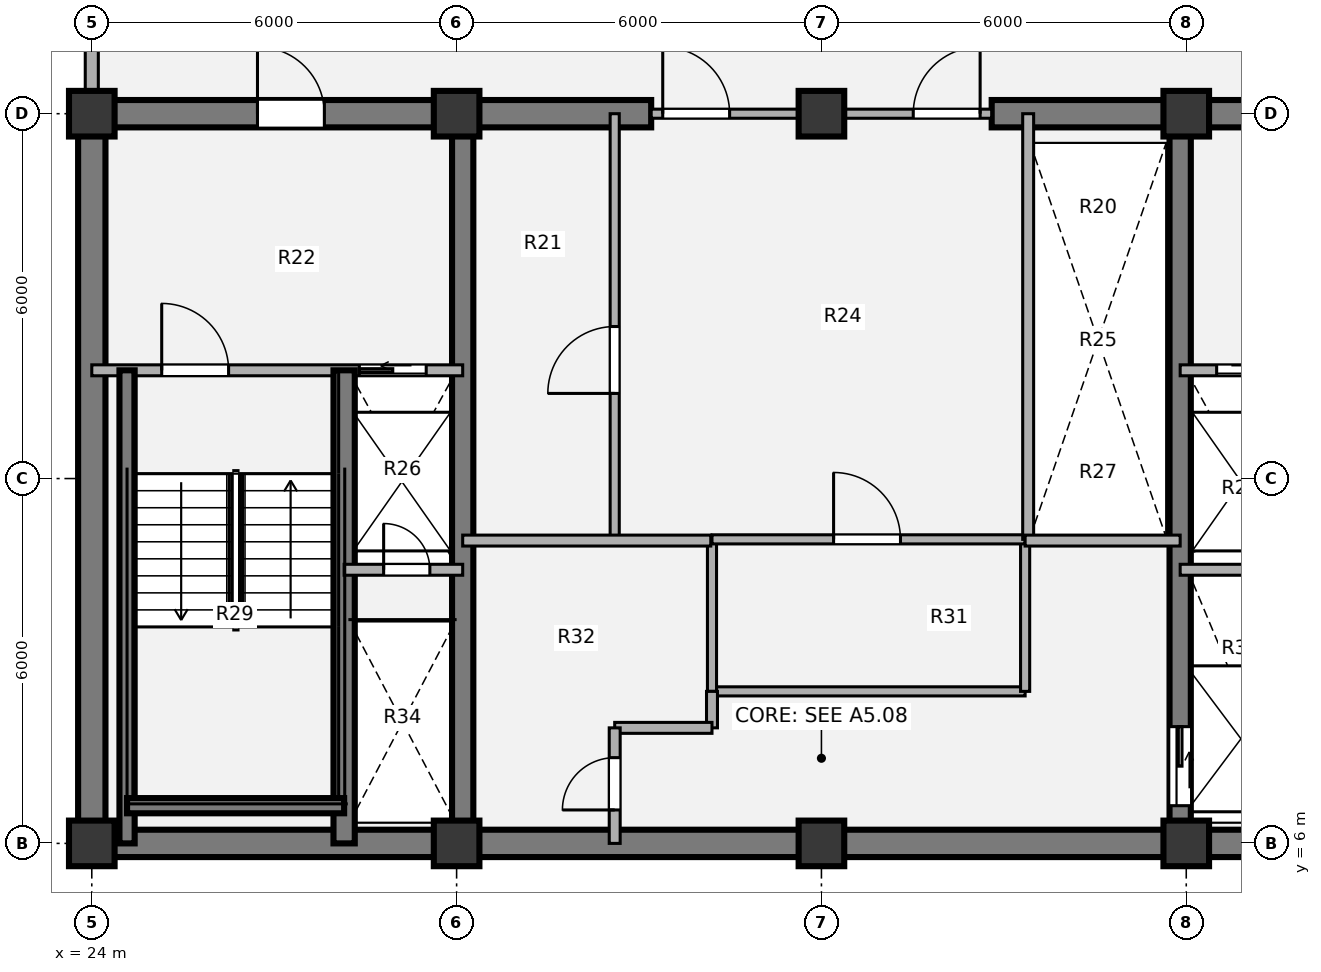
"""IFC4 building model, lengths in metres.
Left out: names, types, materials, properties, quantities, classifications, styles, units other than length and angle.
Written with IfcOpenShell. Run it as: python <this file> out.ifc"""

import sys

from ifc_helpers import new_model, si_unit, direction, frame, frame_2d, origin, origin_2d, place, context, subcontext, project, spatial, rectangle, extrude, source, transform, mapped, element, fill, save


model = new_model("IFC4")
c1 = context("Model", 3, precision=1e-05, world=origin(), true_north=direction((0.0, 1.0)))
c2 = subcontext(c1, "Body", "Model", "MODEL_VIEW")
j1 = project(units=[si_unit("LENGTHUNIT", "METRE"), si_unit("PLANEANGLEUNIT", "RADIAN")], contexts=[c1])
p1 = place(None, origin())
s1 = spatial("IfcSite", under=j1, at=p1, CompositionType="ELEMENT")
p2 = place(p1, origin())
s2 = spatial("IfcBuilding", under=s1, at=p2, CompositionType="ELEMENT")
p3 = place(p2, frame((0.0, 0.0, 179.1)))
s3 = spatial("IfcBuildingStorey", under=s2, at=p3, CompositionType="ELEMENT", Elevation=179.1)
m1 = source(origin(), c2, "Body", "SweptSolid", [
    extrude(rectangle(XDim=0.75, YDim=0.75, at=origin_2d()), origin(), (0.0, 0.0, 1.0), 3.78),
])
for number, where, z_axis, x_axis in (
    (1, (24.0, 6.0, 0.0), (0.0, 0.0, 1.0), (1.0, 0.0, 0.0)),
    (2, (30.0, 6.0, 0.0), (0.0, 0.0, 1.0), (1.0, 0.0, 0.0)),
    (3, (36.0, 6.0, 0.0), (0.0, 0.0, 1.0), (1.0, 0.0, 0.0)),
    (4, (42.0, 6.0, 0.0), (0.0, 0.0, 1.0), (1.0, 0.0, 0.0)),
    (5, (24.0, 18.0, 0.0), (0.0, 0.0, 1.0), (1.0, 0.0, 0.0)),
    (6, (30.0, 18.0, 0.0), (0.0, 0.0, 1.0), (1.0, 0.0, 0.0)),
    (7, (36.0, 18.0, 0.0), (0.0, 0.0, 1.0), (1.0, 0.0, 0.0)),
    (8, (42.0, 18.0, 0.0), (0.0, 0.0, 1.0), (1.0, 0.0, 0.0)),
):
    element("IfcColumn", number, at=place(p3, frame(where, z_axis=z_axis, x_axis=x_axis)), inside=s3, PredefinedType="COLUMN", context=c2, shape_type="MappedRepresentation", body=[
        mapped(m1, transform((0.0, 0.0, 0.0), x_axis=(1.0, 0.0, 0.0), y_axis=(0.0, 1.0, 0.0), z_axis=(0.0, 0.0, 1.0), scale=1.0)),
    ])
p4 = place(p3, frame((48.225, 6.0, 0.0), z_axis=(0.0, 0.0, 1.0), x_axis=(-1.0, 0.0, 0.0)))
e9 = element("IfcWall", 9, at=p4, inside=s3, PredefinedType="SHEAR", context=c2, shape_type="SweptSolid", body=[
    extrude(rectangle(XDim=24.45, YDim=0.45, at=frame_2d((12.225, 0.0))), origin(), (0.0, 0.0, 1.0), 3.78),
])
p5 = place(p3, frame((24.0, 6.0, 0.0), z_axis=(0.0, 0.0, 1.0), x_axis=(0.0, 1.0, 0.0)))
e10 = element("IfcWall", 10, at=p5, inside=s3, PredefinedType="SHEAR", context=c2, shape_type="SweptSolid", body=[
    extrude(rectangle(XDim=12.0, YDim=0.45, at=frame_2d((6.0, 0.0))), origin(), (0.0, 0.0, 1.0), 3.78),
])
p6 = place(p3, frame((23.775, 18.0, 0.0), z_axis=(0.0, 0.0, 1.0), x_axis=(1.0, 0.0, 0.0)))
e11 = element("IfcWall", 11, at=p6, inside=s3, PredefinedType="SHEAR", context=c2, shape_type="SweptSolid", body=[
    extrude(rectangle(XDim=9.425, YDim=0.45, at=frame_2d((4.712, 0.0))), origin(), (0.0, 0.0, 1.0), 3.78),
])
p7 = place(p6, frame((2.95, 0.0, 0.0)))
e12 = element("IfcOpeningElement", 12, at=p7, cuts=e11, PredefinedType="OPENING", context=c2, shape_type="SweptSolid", body=[
    extrude(rectangle(XDim=1.1, YDim=2.1, at=origin_2d()), frame((0.55, 0.235, 1.05), z_axis=(0.0, -1.0, 0.0), x_axis=(1.0, 0.0, 0.0)), (0.0, 0.0, 1.0), 0.47),
])
p8 = place(p3, frame((38.8, 18.0, 0.0), z_axis=(0.0, 0.0, 1.0), x_axis=(1.0, 0.0, 0.0)))
e13 = element("IfcWall", 13, at=p8, inside=s3, PredefinedType="SHEAR", context=c2, shape_type="SweptSolid", body=[
    extrude(rectangle(XDim=9.425, YDim=0.45, at=frame_2d((4.712, 0.0))), origin(), (0.0, 0.0, 1.0), 3.78),
])
p9 = place(p8, frame((5.45, 0.0, 0.0)))
e14 = element("IfcOpeningElement", 14, at=p9, cuts=e13, PredefinedType="OPENING", context=c2, shape_type="SweptSolid", body=[
    extrude(rectangle(XDim=1.1, YDim=2.1, at=origin_2d()), frame((0.55, 0.235, 1.05), z_axis=(0.0, -1.0, 0.0), x_axis=(1.0, 0.0, 0.0)), (0.0, 0.0, 1.0), 0.47),
])
p10 = place(p3, frame((30.1, 6.0, 0.0), z_axis=(0.0, 0.0, 1.0), x_axis=(0.0, 1.0, 0.0)))
e15 = element("IfcWall", 15, at=p10, inside=s3, PredefinedType="SHEAR", context=c2, shape_type="SweptSolid", body=[
    extrude(rectangle(XDim=12.0, YDim=0.35, at=frame_2d((6.0, 0.0))), origin(), (0.0, 0.0, 1.0), 3.78),
])
p11 = place(p3, frame((41.9, 18.0, 0.0), z_axis=(0.0, 0.0, 1.0), x_axis=(0.0, -1.0, 0.0)))
e16 = element("IfcWall", 16, at=p11, inside=s3, PredefinedType="SHEAR", context=c2, shape_type="SweptSolid", body=[
    extrude(rectangle(XDim=12.0, YDim=0.35, at=frame_2d((6.0, 0.0))), origin(), (0.0, 0.0, 1.0), 3.78),
])
p12 = place(p11, frame((10.08, 0.0, 0.0)))
e17 = element("IfcOpeningElement", 17, at=p12, cuts=e16, PredefinedType="OPENING", context=c2, shape_type="SweptSolid", body=[
    extrude(rectangle(XDim=1.3, YDim=2.1, at=origin_2d()), frame((0.65, 0.185, 1.05), z_axis=(0.0, -1.0, 0.0), x_axis=(1.0, 0.0, 0.0)), (0.0, 0.0, 1.0), 0.37),
])
p13 = place(p3, frame((24.0, 18.355, 0.0), z_axis=(0.0, 0.0, 1.0), x_axis=(0.0, 1.0, 0.0)))
e18 = element("IfcWall", 18, at=p13, inside=s3, PredefinedType="SOLIDWALL", context=c2, shape_type="SweptSolid", body=[
    extrude(rectangle(XDim=2.695, YDim=0.215, at=frame_2d((1.348, 0.0))), origin(), (0.0, 0.0, 1.0), 2.718),
])
p14 = place(p3, frame((32.6, 11.0, 0.0), z_axis=(0.0, 0.0, 1.0), x_axis=(0.0, 1.0, 0.0)))
e19 = element("IfcWall", 19, at=p14, inside=s3, PredefinedType="PARTITIONING", context=c2, shape_type="SweptSolid", body=[
    extrude(rectangle(XDim=7.0, YDim=0.15, at=frame_2d((3.5, 0.0))), origin(), (0.0, 0.0, 1.0), 3.5),
])
p15 = place(p14, frame((2.4, 0.0, 0.0)))
e20 = element("IfcOpeningElement", 20, at=p15, cuts=e19, PredefinedType="OPENING", context=c2, shape_type="SweptSolid", body=[
    extrude(rectangle(XDim=1.1, YDim=2.1, at=origin_2d()), frame((0.55, 0.085, 1.05), z_axis=(0.0, -1.0, 0.0), x_axis=(1.0, 0.0, 0.0)), (0.0, 0.0, 1.0), 0.17),
])
p16 = place(p3, frame((34.2, 8.5, 0.0), z_axis=(0.0, 0.0, 1.0), x_axis=(1.0, 0.0, 0.0)))
e21 = element("IfcWall", 21, at=p16, inside=s3, PredefinedType="PARTITIONING", context=c2, shape_type="SweptSolid", body=[
    extrude(rectangle(XDim=5.15, YDim=0.15, at=frame_2d((2.575, 0.0))), origin(), (0.0, 0.0, 1.0), 3.5),
])
for number, where, z_axis, x_axis in (
    (22, (34.2, 8.5, 0.0), (0.0, 0.0, 1.0), (0.0, 1.0, 0.0)),
    (23, (39.35, 8.5, 0.0), (0.0, 0.0, 1.0), (0.0, 1.0, 0.0)),
):
    element("IfcWall", number, at=place(p3, frame(where, z_axis=z_axis, x_axis=x_axis)), inside=s3, PredefinedType="PARTITIONING", context=c2, shape_type="SweptSolid", body=[
        extrude(rectangle(XDim=2.5, YDim=0.15, at=frame_2d((1.25, 0.0))), origin(), (0.0, 0.0, 1.0), 3.5),
    ])
p17 = place(p3, frame((34.2, 11.0, 0.0), z_axis=(0.0, 0.0, 1.0), x_axis=(1.0, 0.0, 0.0)))
e24 = element("IfcWall", 24, at=p17, inside=s3, PredefinedType="PARTITIONING", context=c2, shape_type="SweptSolid", body=[
    extrude(rectangle(XDim=5.15, YDim=0.15, at=frame_2d((2.575, 0.0))), origin(), (0.0, 0.0, 1.0), 3.5),
])
p18 = place(p17, frame((2.0, 0.0, 0.0)))
e25 = element("IfcOpeningElement", 25, at=p18, cuts=e24, PredefinedType="OPENING", context=c2, shape_type="SweptSolid", body=[
    extrude(rectangle(XDim=1.1, YDim=2.1, at=origin_2d()), frame((0.55, 0.085, 1.05), z_axis=(0.0, -1.0, 0.0), x_axis=(1.0, 0.0, 0.0)), (0.0, 0.0, 1.0), 0.17),
])
p19 = place(p3, frame((39.4, 11.0, 0.0), z_axis=(0.0, 0.0, 1.0), x_axis=(0.0, 1.0, 0.0)))
e26 = element("IfcWall", 26, at=p19, inside=s3, PredefinedType="PARTITIONING", context=c2, shape_type="SweptSolid", body=[
    extrude(rectangle(XDim=7.0, YDim=0.18, at=frame_2d((3.5, 0.0))), origin(), (0.0, 0.0, 1.0), 3.5),
])
p20 = place(p3, frame((30.1, 10.98, 0.0), z_axis=(0.0, 0.0, 1.0), x_axis=(1.0, 0.0, 0.0)))
e27 = element("IfcWall", 27, at=p20, inside=s3, PredefinedType="PARTITIONING", context=c2, shape_type="SweptSolid", body=[
    extrude(rectangle(XDim=4.08, YDim=0.18, at=frame_2d((2.04, 0.0))), origin(), (0.0, 0.0, 1.0), 3.5),
])
p21 = place(p3, frame((34.2, 7.9, 0.0), z_axis=(0.0, 0.0, 1.0), x_axis=(0.0, 1.0, 0.0)))
e28 = element("IfcWall", 28, at=p21, inside=s3, PredefinedType="PARTITIONING", context=c2, shape_type="SweptSolid", body=[
    extrude(rectangle(XDim=0.6, YDim=0.18, at=frame_2d((0.3, 0.0))), origin(), (0.0, 0.0, 1.0), 3.5),
])
p22 = place(p3, frame((32.6, 7.9, 0.0), z_axis=(0.0, 0.0, 1.0), x_axis=(1.0, 0.0, 0.0)))
e29 = element("IfcWall", 29, at=p22, inside=s3, PredefinedType="PARTITIONING", context=c2, shape_type="SweptSolid", body=[
    extrude(rectangle(XDim=1.6, YDim=0.18, at=frame_2d((0.8, 0.0))), origin(), (0.0, 0.0, 1.0), 3.5),
])
p23 = place(p3, frame((32.6, 6.0, 0.0), z_axis=(0.0, 0.0, 1.0), x_axis=(0.0, 1.0, 0.0)))
e30 = element("IfcWall", 30, at=p23, inside=s3, PredefinedType="PARTITIONING", context=c2, shape_type="SweptSolid", body=[
    extrude(rectangle(XDim=1.9, YDim=0.18, at=frame_2d((0.95, 0.0))), origin(), (0.0, 0.0, 1.0), 3.5),
])
p24 = place(p23, frame((0.55, 0.0, 0.0)))
e31 = element("IfcOpeningElement", 31, at=p24, cuts=e30, PredefinedType="OPENING", context=c2, shape_type="SweptSolid", body=[
    extrude(rectangle(XDim=0.86, YDim=2.1, at=origin_2d()), frame((0.43, 0.1, 1.05), z_axis=(0.0, -1.0, 0.0), x_axis=(1.0, 0.0, 0.0)), (0.0, 0.0, 1.0), 0.2),
])
p25 = place(p3, frame((39.35, 10.98, 0.0), z_axis=(0.0, 0.0, 1.0), x_axis=(1.0, 0.0, 0.0)))
e32 = element("IfcWall", 32, at=p25, inside=s3, PredefinedType="PARTITIONING", context=c2, shape_type="SweptSolid", body=[
    extrude(rectangle(XDim=2.55, YDim=0.18, at=frame_2d((1.275, 0.0))), origin(), (0.0, 0.0, 1.0), 3.5),
])
p26 = place(p3, frame((33.2, 18.0, 0.0), z_axis=(0.0, 0.0, 1.0), x_axis=(1.0, 0.0, 0.0)))
e33 = element("IfcWall", 33, at=p26, inside=s3, PredefinedType="PARTITIONING", context=c2, shape_type="SweptSolid", body=[
    extrude(rectangle(XDim=5.6, YDim=0.15, at=frame_2d((2.8, 0.0))), origin(), (0.0, 0.0, 1.0), 2.515),
])
p27 = place(p26, frame((0.19, 0.0, 0.0)))
e34 = element("IfcOpeningElement", 34, at=p27, cuts=e33, PredefinedType="OPENING", context=c2, shape_type="SweptSolid", body=[
    extrude(rectangle(XDim=1.1, YDim=2.1, at=origin_2d()), frame((0.55, 0.085, 1.05), z_axis=(0.0, -1.0, 0.0), x_axis=(1.0, 0.0, 0.0)), (0.0, 0.0, 1.0), 0.17),
])
p28 = place(p26, frame((4.31, 0.0, 0.0)))
e35 = element("IfcOpeningElement", 35, at=p28, cuts=e33, PredefinedType="OPENING", context=c2, shape_type="SweptSolid", body=[
    extrude(rectangle(XDim=1.1, YDim=2.1, at=origin_2d()), frame((0.55, 0.085, 1.05), z_axis=(0.0, -1.0, 0.0), x_axis=(1.0, 0.0, 0.0)), (0.0, 0.0, 1.0), 0.17),
])
p29 = place(p3, frame((24.0, 13.78, 0.0), z_axis=(0.0, 0.0, 1.0), x_axis=(1.0, 0.0, 0.0)))
e36 = element("IfcWall", 36, at=p29, inside=s3, PredefinedType="PARTITIONING", context=c2, shape_type="SweptSolid", body=[
    extrude(rectangle(XDim=6.1, YDim=0.18, at=frame_2d((3.05, 0.0))), origin(), (0.0, 0.0, 1.0), 3.5),
])
p30 = place(p29, frame((1.15, 0.0, 0.0)))
e37 = element("IfcOpeningElement", 37, at=p30, cuts=e36, PredefinedType="OPENING", context=c2, shape_type="SweptSolid", body=[
    extrude(rectangle(XDim=1.1, YDim=2.1, at=origin_2d()), frame((0.55, 0.1, 1.05), z_axis=(0.0, -1.0, 0.0), x_axis=(1.0, 0.0, 0.0)), (0.0, 0.0, 1.0), 0.2),
])
p31 = place(p29, frame((4.4, 0.0, 0.0)))
e38 = element("IfcOpeningElement", 38, at=p31, cuts=e36, PredefinedType="OPENING", context=c2, shape_type="SweptSolid", body=[
    extrude(rectangle(XDim=1.1, YDim=2.1, at=origin_2d()), frame((0.55, 0.1, 1.05), z_axis=(0.0, -1.0, 0.0), x_axis=(1.0, 0.0, 0.0)), (0.0, 0.0, 1.0), 0.2),
])
p32 = place(p3, frame((28.15, 6.0, 0.0), z_axis=(0.0, 0.0, 1.0), x_axis=(0.0, 1.0, 0.0)))
e39 = element("IfcWall", 39, at=p32, inside=s3, PredefinedType="SHEAR", context=c2, shape_type="SweptSolid", body=[
    extrude(rectangle(XDim=7.78, YDim=0.35, at=frame_2d((3.89, 0.0))), origin(), (0.0, 0.0, 1.0), 3.85),
])
p33 = place(p3, frame((24.58, 6.0, 0.0), z_axis=(0.0, 0.0, 1.0), x_axis=(0.0, 1.0, 0.0)))
e40 = element("IfcWall", 40, at=p33, inside=s3, PredefinedType="SHEAR", context=c2, shape_type="SweptSolid", body=[
    extrude(rectangle(XDim=7.78, YDim=0.25, at=frame_2d((3.89, 0.0))), origin(), (0.0, 0.0, 1.0), 3.85),
])
p34 = place(p3, frame((24.58, 6.62, 0.0), z_axis=(0.0, 0.0, 1.0), x_axis=(1.0, 0.0, 0.0)))
e41 = element("IfcWall", 41, at=p34, inside=s3, PredefinedType="SHEAR", context=c2, shape_type="SweptSolid", body=[
    extrude(rectangle(XDim=3.57, YDim=0.25, at=frame_2d((1.785, 0.0))), origin(), (0.0, 0.0, 1.0), 3.85),
])
p35 = place(p3, frame((28.15, 10.5, 0.0), z_axis=(0.0, 0.0, 1.0), x_axis=(1.0, 0.0, 0.0)))
e42 = element("IfcWall", 42, at=p35, inside=s3, PredefinedType="PARTITIONING", context=c2, shape_type="SweptSolid", body=[
    extrude(rectangle(XDim=1.95, YDim=0.18, at=frame_2d((0.975, 0.0))), origin(), (0.0, 0.0, 1.0), 3.5),
])
p36 = place(p35, frame((0.65, 0.0, 0.0)))
e43 = element("IfcOpeningElement", 43, at=p36, cuts=e42, PredefinedType="OPENING", context=c2, shape_type="SweptSolid", body=[
    extrude(rectangle(XDim=0.76, YDim=2.05, at=origin_2d()), frame((0.38, 0.1, 1.025), z_axis=(0.0, -1.0, 0.0), x_axis=(1.0, 0.0, 0.0)), (0.0, 0.0, 1.0), 0.2),
])
p37 = place(p3, frame((41.9, 13.78, 0.0), z_axis=(0.0, 0.0, 1.0), x_axis=(1.0, 0.0, 0.0)))
e44 = element("IfcWall", 44, at=p37, inside=s3, PredefinedType="PARTITIONING", context=c2, shape_type="SweptSolid", body=[
    extrude(rectangle(XDim=6.1, YDim=0.18, at=frame_2d((3.05, 0.0))), origin(), (0.0, 0.0, 1.0), 3.5),
])
p38 = place(p37, frame((0.6, 0.0, 0.0)))
e45 = element("IfcOpeningElement", 45, at=p38, cuts=e44, PredefinedType="OPENING", context=c2, shape_type="SweptSolid", body=[
    extrude(rectangle(XDim=1.1, YDim=2.1, at=origin_2d()), frame((0.55, 0.1, 1.05), z_axis=(0.0, -1.0, 0.0), x_axis=(1.0, 0.0, 0.0)), (0.0, 0.0, 1.0), 0.2),
])
p39 = place(p37, frame((3.8, 0.0, 0.0)))
e46 = element("IfcOpeningElement", 46, at=p39, cuts=e44, PredefinedType="OPENING", context=c2, shape_type="SweptSolid", body=[
    extrude(rectangle(XDim=1.1, YDim=2.1, at=origin_2d()), frame((0.55, 0.1, 1.05), z_axis=(0.0, -1.0, 0.0), x_axis=(1.0, 0.0, 0.0)), (0.0, 0.0, 1.0), 0.2),
])
p40 = place(p3, frame((41.9, 10.5, 0.0), z_axis=(0.0, 0.0, 1.0), x_axis=(1.0, 0.0, 0.0)))
e47 = element("IfcWall", 47, at=p40, inside=s3, PredefinedType="PARTITIONING", context=c2, shape_type="SweptSolid", body=[
    extrude(rectangle(XDim=1.95, YDim=0.18, at=frame_2d((0.975, 0.0))), origin(), (0.0, 0.0, 1.0), 3.5),
])
m2 = source(origin(), c2, "Body", "SweptSolid", [
    extrude(rectangle(XDim=1.1, YDim=2.1, at=origin_2d()), frame((0.55, 0.025, 1.05), z_axis=(0.0, -1.0, 0.0), x_axis=(1.0, 0.0, 0.0)), (0.0, 0.0, 1.0), 0.05),
])
p41 = place(p15, origin())
e48 = element("IfcDoor", 48, at=p41, inside=s3, OperationType="SINGLE_SWING_LEFT", PredefinedType="DOOR", context=c2, shape_type="MappedRepresentation", body=[
    mapped(m2, transform((0.0, 0.0, 0.0), x_axis=(1.0, 0.0, 0.0), y_axis=(0.0, 1.0, 0.0), z_axis=(0.0, 0.0, 1.0), scale=1.0)),
])
fill(e20, e48)
p42 = place(p18, origin())
e49 = element("IfcDoor", 49, at=p42, inside=s3, OperationType="SINGLE_SWING_LEFT", PredefinedType="DOOR", context=c2, shape_type="MappedRepresentation", body=[
    mapped(m2, transform((0.0, 0.0, 0.0), x_axis=(1.0, 0.0, 0.0), y_axis=(0.0, 1.0, 0.0), z_axis=(0.0, 0.0, 1.0), scale=1.0)),
])
fill(e25, e49)
m3 = source(origin(), c2, "Body", "SweptSolid", [
    extrude(rectangle(XDim=0.86, YDim=2.1, at=origin_2d()), frame((0.43, 0.025, 1.05), z_axis=(0.0, -1.0, 0.0), x_axis=(1.0, 0.0, 0.0)), (0.0, 0.0, 1.0), 0.05),
])
p43 = place(p24, origin())
e50 = element("IfcDoor", 50, at=p43, inside=s3, OperationType="SINGLE_SWING_LEFT", PredefinedType="DOOR", context=c2, shape_type="MappedRepresentation", body=[
    mapped(m3, transform((0.0, 0.0, 0.0), x_axis=(1.0, 0.0, 0.0), y_axis=(0.0, 1.0, 0.0), z_axis=(0.0, 0.0, 1.0), scale=1.0)),
])
fill(e31, e50)
m4 = source(origin(), c2, "Body", "SweptSolid", [
    extrude(rectangle(XDim=1.1, YDim=2.1, at=origin_2d()), frame((0.55, 0.025, 1.05), z_axis=(0.0, -1.0, 0.0), x_axis=(1.0, 0.0, 0.0)), (0.0, 0.0, 1.0), 0.05),
])
p44 = place(p27, origin())
e51 = element("IfcDoor", 51, at=p44, inside=s3, OperationType="SINGLE_SWING_LEFT", PredefinedType="DOOR", context=c2, shape_type="MappedRepresentation", body=[
    mapped(m4, transform((0.0, 0.0, 0.0), x_axis=(1.0, 0.0, 0.0), y_axis=(0.0, 1.0, 0.0), z_axis=(0.0, 0.0, 1.0), scale=1.0)),
])
fill(e34, e51)
p45 = place(p28, origin())
e52 = element("IfcDoor", 52, at=p45, inside=s3, OperationType="SINGLE_SWING_RIGHT", PredefinedType="DOOR", context=c2, shape_type="MappedRepresentation", body=[
    mapped(m4, transform((0.0, 0.0, 0.0), x_axis=(1.0, 0.0, 0.0), y_axis=(0.0, 1.0, 0.0), z_axis=(0.0, 0.0, 1.0), scale=1.0)),
])
fill(e35, e52)
m5 = source(origin(), c2, "Body", "SweptSolid", [
    extrude(rectangle(XDim=1.1, YDim=2.1, at=origin_2d()), frame((0.55, 0.025, 1.05), z_axis=(0.0, -1.0, 0.0), x_axis=(1.0, 0.0, 0.0)), (0.0, 0.0, 1.0), 0.05),
])
p46 = place(p30, origin())
e53 = element("IfcDoor", 53, at=p46, inside=s3, OperationType="SINGLE_SWING_LEFT", PredefinedType="DOOR", context=c2, shape_type="MappedRepresentation", body=[
    mapped(m5, transform((0.0, 0.0, 0.0), x_axis=(1.0, 0.0, 0.0), y_axis=(0.0, 1.0, 0.0), z_axis=(0.0, 0.0, 1.0), scale=1.0)),
])
fill(e37, e53)
m6 = source(origin(), c2, "Body", "SweptSolid", [
    extrude(rectangle(XDim=1.1, YDim=2.1, at=origin_2d()), frame((0.55, 0.025, 1.05), z_axis=(0.0, -1.0, 0.0), x_axis=(1.0, 0.0, 0.0)), (0.0, 0.0, 1.0), 0.05),
])
p47 = place(p31, origin())
e54 = element("IfcDoor", 54, at=p47, inside=s3, OperationType="SLIDING_TO_LEFT", PredefinedType="DOOR", context=c2, shape_type="MappedRepresentation", body=[
    mapped(m6, transform((0.0, 0.0, 0.0), x_axis=(1.0, 0.0, 0.0), y_axis=(0.0, 1.0, 0.0), z_axis=(0.0, 0.0, 1.0), scale=1.0)),
])
fill(e38, e54)
m7 = source(origin(), c2, "Body", "SweptSolid", [
    extrude(rectangle(XDim=0.76, YDim=2.05, at=origin_2d()), frame((0.38, 0.025, 1.025), z_axis=(0.0, -1.0, 0.0), x_axis=(1.0, 0.0, 0.0)), (0.0, 0.0, 1.0), 0.05),
])
p48 = place(p36, origin())
e55 = element("IfcDoor", 55, at=p48, inside=s3, OperationType="SINGLE_SWING_LEFT", PredefinedType="DOOR", context=c2, shape_type="MappedRepresentation", body=[
    mapped(m7, transform((0.0, 0.0, 0.0), x_axis=(1.0, 0.0, 0.0), y_axis=(0.0, 1.0, 0.0), z_axis=(0.0, 0.0, 1.0), scale=1.0)),
])
fill(e43, e55)
p49 = place(p38, origin())
e56 = element("IfcDoor", 56, at=p49, inside=s3, OperationType="SLIDING_TO_RIGHT", PredefinedType="DOOR", context=c2, shape_type="MappedRepresentation", body=[
    mapped(m6, transform((0.0, 0.0, 0.0), x_axis=(1.0, 0.0, 0.0), y_axis=(0.0, 1.0, 0.0), z_axis=(0.0, 0.0, 1.0), scale=1.0)),
])
fill(e45, e56)
m8 = source(origin(), c2, "Body", "SweptSolid", [
    extrude(rectangle(XDim=1.3, YDim=2.1, at=origin_2d()), frame((0.65, 0.025, 1.05), z_axis=(0.0, -1.0, 0.0), x_axis=(1.0, 0.0, 0.0)), (0.0, 0.0, 1.0), 0.05),
])
p50 = place(p12, origin())
e57 = element("IfcDoor", 57, at=p50, inside=s3, OperationType="SLIDING_TO_LEFT", PredefinedType="DOOR", context=c2, shape_type="MappedRepresentation", body=[
    mapped(m8, transform((0.0, 0.0, 0.0), x_axis=(1.0, 0.0, 0.0), y_axis=(0.0, 1.0, 0.0), z_axis=(0.0, 0.0, 1.0), scale=1.0)),
])
fill(e17, e57)
p51 = place(p7, origin())
e58 = element("IfcDoor", 58, at=p51, inside=s3, OperationType="SINGLE_SWING_LEFT", PredefinedType="DOOR", context=c2, shape_type="MappedRepresentation", body=[
    mapped(m4, transform((0.0, 0.0, 0.0), x_axis=(1.0, 0.0, 0.0), y_axis=(0.0, 1.0, 0.0), z_axis=(0.0, 0.0, 1.0), scale=1.0)),
])
fill(e12, e58)
save(model, sys.argv[1])
